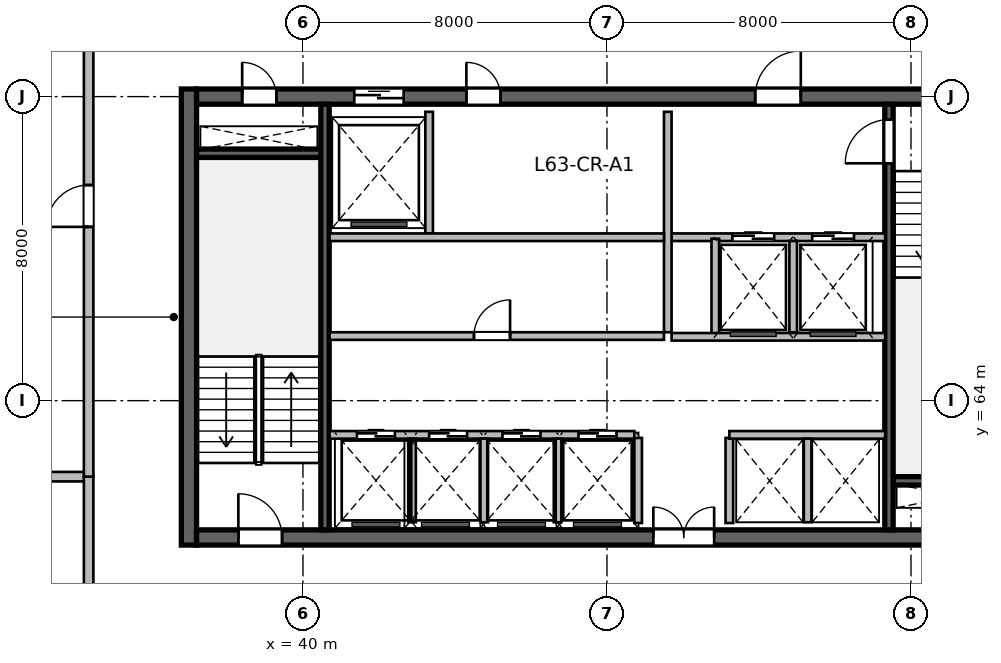
"""IFC4 building model, lengths in metres.
Left out: names, types, materials, properties, quantities, classifications, styles, units other than length and angle.
Written with IfcOpenShell. Run it as: python <this file> out.ifc"""

import sys

from ifc_helpers import new_model, si_unit, direction, frame, frame_2d, origin, place, context, subcontext, project, spatial, rectangle, extrude, source, transform, mapped, element, fill, save


model = new_model("IFC4")
c1 = context("Model", 3, precision=1e-05, world=origin(), true_north=direction((0.0, 1.0)))
c2 = subcontext(c1, "Body", "Model", "MODEL_VIEW")
j1 = project(units=[si_unit("LENGTHUNIT", "METRE"), si_unit("PLANEANGLEUNIT", "RADIAN")], contexts=[c1])
p1 = place(None, origin())
s1 = spatial("IfcSite", under=j1, at=p1, CompositionType="ELEMENT")
p2 = place(p1, origin())
s2 = spatial("IfcBuilding", under=s1, at=p2, CompositionType="ELEMENT")
p3 = place(p2, frame((0.0, 0.0, 260.1)))
s3 = spatial("IfcBuildingStorey", under=s2, at=p3, CompositionType="ELEMENT", Elevation=260.1)
m1 = source(origin(), c2, "Body", "SweptSolid", [
    extrude(rectangle(XDim=12.0, YDim=0.4, at=frame_2d((6.0, 0.0))), origin(), (0.0, 0.0, 1.0), 3.9),
])
p4 = place(p3, frame((37.0, 60.2, 0.0), z_axis=(0.0, 0.0, 1.0), x_axis=(0.0, 1.0, 0.0)))
e1 = element("IfcWall", 1, at=p4, inside=s3, PredefinedType="SHEAR", context=c2, shape_type="MappedRepresentation", body=[
    mapped(m1, transform((0.0, 0.0, 0.0), scale=1.0)),
])
m2 = source(origin(), c2, "Body", "SweptSolid", [
    extrude(rectangle(XDim=21.6, YDim=0.4, at=frame_2d((10.8, 0.0))), origin(), (0.0, 0.0, 1.0), 3.9),
])
p5 = place(p3, frame((37.2, 60.4, 0.0), z_axis=(0.0, 0.0, 1.0), x_axis=(1.0, 0.0, 0.0)))
e2 = element("IfcWall", 2, at=p5, inside=s3, PredefinedType="SHEAR", context=c2, shape_type="MappedRepresentation", body=[
    mapped(m2, transform((0.0, 0.0, 0.0), scale=1.0)),
])
p6 = place(p5, frame((1.1, 0.0, 0.0)))
e3 = element("IfcOpeningElement", 3, at=p6, cuts=e2, PredefinedType="OPENING", context=c2, shape_type="SweptSolid", body=[
    extrude(rectangle(XDim=1.15, YDim=2.15, at=frame_2d((0.575, 1.075))), frame((0.0, 0.21, 0.0), z_axis=(0.0, -1.0, 0.0), x_axis=(1.0, 0.0, 0.0)), (0.0, 0.0, 1.0), 0.42),
])
p7 = place(p5, frame((19.5, 0.0, 0.0)))
e4 = element("IfcOpeningElement", 4, at=p7, cuts=e2, PredefinedType="OPENING", context=c2, shape_type="SweptSolid", body=[
    extrude(rectangle(XDim=0.9, YDim=2.1, at=frame_2d((0.45, 1.05))), frame((0.0, 0.21, 0.0), z_axis=(0.0, -1.0, 0.0), x_axis=(1.0, 0.0, 0.0)), (0.0, 0.0, 1.0), 0.42),
])
p8 = place(p5, frame((12.02, 0.0, 0.0)))
e5 = element("IfcOpeningElement", 5, at=p8, cuts=e2, PredefinedType="OPENING", context=c2, shape_type="SweptSolid", body=[
    extrude(rectangle(XDim=1.6, YDim=2.15, at=frame_2d((0.8, 1.075))), frame((0.0, 0.21, 0.0), z_axis=(0.0, -1.0, 0.0), x_axis=(1.0, 0.0, 0.0)), (0.0, 0.0, 1.0), 0.42),
])
p9 = place(p3, frame((37.2, 72.0, 0.0), z_axis=(0.0, 0.0, 1.0), x_axis=(1.0, 0.0, 0.0)))
e6 = element("IfcWall", 6, at=p9, inside=s3, PredefinedType="SHEAR", context=c2, shape_type="MappedRepresentation", body=[
    mapped(m2, transform((0.0, 0.0, 0.0), scale=1.0)),
])
p10 = place(p9, frame((1.2, 0.0, 0.0)))
e7 = element("IfcOpeningElement", 7, at=p10, cuts=e6, PredefinedType="OPENING", context=c2, shape_type="SweptSolid", body=[
    extrude(rectangle(XDim=0.9, YDim=2.1, at=frame_2d((0.45, 1.05))), frame((0.0, 0.21, 0.0), z_axis=(0.0, -1.0, 0.0), x_axis=(1.0, 0.0, 0.0)), (0.0, 0.0, 1.0), 0.42),
])
p11 = place(p9, frame((14.7, 0.0, 0.0)))
e8 = element("IfcOpeningElement", 8, at=p11, cuts=e6, PredefinedType="OPENING", context=c2, shape_type="SweptSolid", body=[
    extrude(rectangle(XDim=1.2, YDim=2.15, at=frame_2d((0.6, 1.075))), frame((0.0, 0.21, 0.0), z_axis=(0.0, -1.0, 0.0), x_axis=(1.0, 0.0, 0.0)), (0.0, 0.0, 1.0), 0.42),
])
p12 = place(p9, frame((4.15, 0.0, 0.0)))
e9 = element("IfcOpeningElement", 9, at=p12, cuts=e6, PredefinedType="OPENING", context=c2, shape_type="SweptSolid", body=[
    extrude(rectangle(XDim=1.3, YDim=2.15, at=frame_2d((0.65, 1.075))), frame((0.0, 0.21, 0.0), z_axis=(0.0, -1.0, 0.0), x_axis=(1.0, 0.0, 0.0)), (0.0, 0.0, 1.0), 0.42),
])
p13 = place(p9, frame((7.1, 0.0, 0.0)))
e10 = element("IfcOpeningElement", 10, at=p13, cuts=e6, PredefinedType="OPENING", context=c2, shape_type="SweptSolid", body=[
    extrude(rectangle(XDim=0.9, YDim=2.1, at=frame_2d((0.45, 1.05))), frame((0.0, 0.21, 0.0), z_axis=(0.0, -1.0, 0.0), x_axis=(1.0, 0.0, 0.0)), (0.0, 0.0, 1.0), 0.42),
])
m3 = source(origin(), c2, "Body", "SweptSolid", [
    extrude(rectangle(XDim=3.27, YDim=0.22, at=frame_2d((1.635, 0.0))), origin(), (0.0, 0.0, 1.0), 3.9),
])
for number, where, z_axis, x_axis in (
    (11, (37.2, 70.51, 0.0), (0.0, 0.0, 1.0), (1.0, 0.0, 0.0)),
    (12, (55.53, 61.89, 0.0), (0.0, 0.0, 1.0), (1.0, 0.0, 0.0)),
):
    element("IfcWall", number, at=place(p3, frame(where, z_axis=z_axis, x_axis=x_axis)), inside=s3, PredefinedType="SHEAR", context=c2, shape_type="MappedRepresentation", body=[
        mapped(m3, transform((0.0, 0.0, 0.0), scale=1.0)),
    ])
m4 = source(origin(), c2, "Body", "SweptSolid", [
    extrude(rectangle(XDim=11.2, YDim=0.22, at=frame_2d((5.6, 0.0))), origin(), (0.0, 0.0, 1.0), 3.9),
])
p14 = place(p3, frame((40.58, 60.6, 0.0), z_axis=(0.0, 0.0, 1.0), x_axis=(0.0, 1.0, 0.0)))
e13 = element("IfcWall", 13, at=p14, inside=s3, PredefinedType="SHEAR", context=c2, shape_type="MappedRepresentation", body=[
    mapped(m4, transform((0.0, 0.0, 0.0), scale=1.0)),
])
p15 = place(p3, frame((55.42, 60.6, 0.0), z_axis=(0.0, 0.0, 1.0), x_axis=(0.0, 1.0, 0.0)))
e14 = element("IfcWall", 14, at=p15, inside=s3, PredefinedType="SHEAR", context=c2, shape_type="MappedRepresentation", body=[
    mapped(m4, transform((0.0, 0.0, 0.0), scale=1.0)),
])
p16 = place(p15, frame((9.645, 0.0, 0.0)))
e15 = element("IfcOpeningElement", 15, at=p16, cuts=e14, PredefinedType="OPENING", context=c2, shape_type="SweptSolid", body=[
    extrude(rectangle(XDim=1.15, YDim=2.15, at=frame_2d((0.575, 1.075))), frame((0.0, 0.12, 0.0), z_axis=(0.0, -1.0, 0.0), x_axis=(1.0, 0.0, 0.0)), (0.0, 0.0, 1.0), 0.24),
])
m5 = source(origin(), c2, "Body", "SweptSolid", [
    extrude(rectangle(XDim=2.24, YDim=0.2, at=frame_2d((1.12, 0.0))), origin(), (0.0, 0.0, 1.0), 3.65),
])
for number, where, z_axis, x_axis in (
    (16, (48.82, 60.78, 0.0), (0.0, 0.0, 1.0), (0.0, 1.0, 0.0)),
    (17, (51.22, 60.78, 0.0), (0.0, 0.0, 1.0), (0.0, 1.0, 0.0)),
):
    element("IfcWall", number, at=place(p3, frame(where, z_axis=z_axis, x_axis=x_axis)), inside=s3, PredefinedType="SOLIDWALL", context=c2, shape_type="MappedRepresentation", body=[
        mapped(m5, transform((0.0, 0.0, 0.0), scale=1.0)),
    ])
m6 = source(origin(), c2, "Body", "SweptSolid", [
    extrude(rectangle(XDim=5.62, YDim=0.2, at=frame_2d((2.81, 0.0))), origin(), (0.0, 0.0, 1.0), 3.65),
])
p17 = place(p3, frame((49.7, 68.3, 0.0), z_axis=(0.0, 0.0, 1.0), x_axis=(1.0, 0.0, 0.0)))
e18 = element("IfcWall", 18, at=p17, inside=s3, PredefinedType="SOLIDWALL", context=c2, shape_type="MappedRepresentation", body=[
    mapped(m6, transform((0.0, 0.0, 0.0), scale=1.0)),
])
p18 = place(p17, frame((1.6, 0.0, 0.0)))
e19 = element("IfcOpeningElement", 19, at=p18, cuts=e18, PredefinedType="OPENING", context=c2, shape_type="SweptSolid", body=[
    extrude(rectangle(XDim=1.1, YDim=2.15, at=frame_2d((0.55, 1.075))), frame((0.0, 0.11, 0.0), z_axis=(0.0, -1.0, 0.0), x_axis=(1.0, 0.0, 0.0)), (0.0, 0.0, 1.0), 0.22),
])
p19 = place(p17, frame((3.7, 0.0, 0.0)))
e20 = element("IfcOpeningElement", 20, at=p19, cuts=e18, PredefinedType="OPENING", context=c2, shape_type="SweptSolid", body=[
    extrude(rectangle(XDim=1.1, YDim=2.15, at=frame_2d((0.55, 1.075))), frame((0.0, 0.11, 0.0), z_axis=(0.0, -1.0, 0.0), x_axis=(1.0, 0.0, 0.0)), (0.0, 0.0, 1.0), 0.22),
])
m7 = source(origin(), c2, "Body", "SweptSolid", [
    extrude(rectangle(XDim=5.8, YDim=0.2, at=frame_2d((2.9, 0.0))), origin(), (0.0, 0.0, 1.0), 3.65),
])
p20 = place(p3, frame((49.6, 65.8, 0.0), z_axis=(0.0, 0.0, 1.0), x_axis=(0.0, 1.0, 0.0)))
e21 = element("IfcWall", 21, at=p20, inside=s3, PredefinedType="SOLIDWALL", context=c2, shape_type="MappedRepresentation", body=[
    mapped(m7, transform((0.0, 0.0, 0.0), scale=1.0)),
])
m8 = source(origin(), c2, "Body", "SweptSolid", [
    extrude(rectangle(XDim=2.58, YDim=0.2, at=frame_2d((1.29, 0.0))), origin(), (0.0, 0.0, 1.0), 3.65),
])
p21 = place(p3, frame((50.85, 65.68, 0.0), z_axis=(0.0, 0.0, 1.0), x_axis=(0.0, 1.0, 0.0)))
e22 = element("IfcWall", 22, at=p21, inside=s3, PredefinedType="SOLIDWALL", context=c2, shape_type="MappedRepresentation", body=[
    mapped(m8, transform((0.0, 0.0, 0.0), scale=1.0)),
])
m9 = source(origin(), c2, "Body", "SweptSolid", [
    extrude(rectangle(XDim=2.4, YDim=0.2, at=frame_2d((1.2, 0.0))), origin(), (0.0, 0.0, 1.0), 3.65),
])
p22 = place(p3, frame((52.9, 65.8, 0.0), z_axis=(0.0, 0.0, 1.0), x_axis=(0.0, 1.0, 0.0)))
e23 = element("IfcWall", 23, at=p22, inside=s3, PredefinedType="SOLIDWALL", context=c2, shape_type="MappedRepresentation", body=[
    mapped(m9, transform((0.0, 0.0, 0.0), scale=1.0)),
])
p23 = place(p3, frame((49.7, 65.68, 0.0), z_axis=(0.0, 0.0, 1.0), x_axis=(1.0, 0.0, 0.0)))
e24 = element("IfcWall", 24, at=p23, inside=s3, PredefinedType="SOLIDWALL", context=c2, shape_type="MappedRepresentation", body=[
    mapped(m6, transform((0.0, 0.0, 0.0), scale=1.0)),
])
m10 = source(origin(), c2, "Body", "SweptSolid", [
    extrude(rectangle(XDim=3.2, YDim=0.2, at=frame_2d((1.6, 0.0))), origin(), (0.0, 0.0, 1.0), 3.65),
])
p24 = place(p3, frame((43.32, 68.4, 0.0), z_axis=(0.0, 0.0, 1.0), x_axis=(0.0, 1.0, 0.0)))
e25 = element("IfcWall", 25, at=p24, inside=s3, PredefinedType="SOLIDWALL", context=c2, shape_type="MappedRepresentation", body=[
    mapped(m10, transform((0.0, 0.0, 0.0), scale=1.0)),
])
m11 = source(origin(), c2, "Body", "SweptSolid", [
    extrude(rectangle(XDim=8.8, YDim=0.2, at=frame_2d((4.4, 0.0))), origin(), (0.0, 0.0, 1.0), 3.65),
])
p25 = place(p3, frame((40.7, 68.3, 0.0), z_axis=(0.0, 0.0, 1.0), x_axis=(1.0, 0.0, 0.0)))
e26 = element("IfcWall", 26, at=p25, inside=s3, PredefinedType="SOLIDWALL", context=c2, shape_type="MappedRepresentation", body=[
    mapped(m11, transform((0.0, 0.0, 0.0), scale=1.0)),
])
m12 = source(origin(), c2, "Body", "SweptSolid", [
    extrude(rectangle(XDim=8.02, YDim=0.2, at=frame_2d((4.01, 0.0))), origin(), (0.0, 0.0, 1.0), 3.65),
])
p26 = place(p3, frame((40.7, 63.1, 0.0), z_axis=(0.0, 0.0, 1.0), x_axis=(1.0, 0.0, 0.0)))
e27 = element("IfcWall", 27, at=p26, inside=s3, PredefinedType="SOLIDWALL", context=c2, shape_type="MappedRepresentation", body=[
    mapped(m12, transform((0.0, 0.0, 0.0), scale=1.0)),
])
p27 = place(p26, frame((0.72, 0.0, 0.0)))
e28 = element("IfcOpeningElement", 28, at=p27, cuts=e27, PredefinedType="OPENING", context=c2, shape_type="SweptSolid", body=[
    extrude(rectangle(XDim=1.0, YDim=2.15, at=frame_2d((0.5, 1.075))), frame((0.0, 0.11, 0.0), z_axis=(0.0, -1.0, 0.0), x_axis=(1.0, 0.0, 0.0)), (0.0, 0.0, 1.0), 0.22),
])
p28 = place(p26, frame((2.62, 0.0, 0.0)))
e29 = element("IfcOpeningElement", 29, at=p28, cuts=e27, PredefinedType="OPENING", context=c2, shape_type="SweptSolid", body=[
    extrude(rectangle(XDim=1.0, YDim=2.15, at=frame_2d((0.5, 1.075))), frame((0.0, 0.11, 0.0), z_axis=(0.0, -1.0, 0.0), x_axis=(1.0, 0.0, 0.0)), (0.0, 0.0, 1.0), 0.22),
])
p29 = place(p26, frame((4.55, 0.0, 0.0)))
e30 = element("IfcOpeningElement", 30, at=p29, cuts=e27, PredefinedType="OPENING", context=c2, shape_type="SweptSolid", body=[
    extrude(rectangle(XDim=1.0, YDim=2.15, at=frame_2d((0.5, 1.075))), frame((0.0, 0.11, 0.0), z_axis=(0.0, -1.0, 0.0), x_axis=(1.0, 0.0, 0.0)), (0.0, 0.0, 1.0), 0.22),
])
p30 = place(p26, frame((6.55, 0.0, 0.0)))
e31 = element("IfcOpeningElement", 31, at=p30, cuts=e27, PredefinedType="OPENING", context=c2, shape_type="SweptSolid", body=[
    extrude(rectangle(XDim=1.0, YDim=2.15, at=frame_2d((0.5, 1.075))), frame((0.0, 0.11, 0.0), z_axis=(0.0, -1.0, 0.0), x_axis=(1.0, 0.0, 0.0)), (0.0, 0.0, 1.0), 0.22),
])
m13 = source(origin(), c2, "Body", "SweptSolid", [
    extrude(rectangle(XDim=4.1, YDim=0.2, at=frame_2d((2.05, 0.0))), origin(), (0.0, 0.0, 1.0), 3.65),
])
p31 = place(p3, frame((51.22, 63.1, 0.0), z_axis=(0.0, 0.0, 1.0), x_axis=(1.0, 0.0, 0.0)))
e32 = element("IfcWall", 32, at=p31, inside=s3, PredefinedType="SOLIDWALL", context=c2, shape_type="MappedRepresentation", body=[
    mapped(m13, transform((0.0, 0.0, 0.0), scale=1.0)),
])
m14 = source(origin(), c2, "Body", "SweptSolid", [
    extrude(rectangle(XDim=2.2, YDim=0.2, at=frame_2d((1.1, 0.0))), origin(), (0.0, 0.0, 1.0), 3.65),
])
for number, where, z_axis, x_axis in (
    (33, (42.87, 60.8, 0.0), (0.0, 0.0, 1.0), (0.0, 1.0, 0.0)),
    (34, (44.77, 60.8, 0.0), (0.0, 0.0, 1.0), (0.0, 1.0, 0.0)),
    (35, (46.7, 60.8, 0.0), (0.0, 0.0, 1.0), (0.0, 1.0, 0.0)),
    (36, (53.28, 60.8, 0.0), (0.0, 0.0, 1.0), (0.0, 1.0, 0.0)),
):
    element("IfcWall", number, at=place(p3, frame(where, z_axis=z_axis, x_axis=x_axis)), inside=s3, PredefinedType="SOLIDWALL", context=c2, shape_type="MappedRepresentation", body=[
        mapped(m14, transform((0.0, 0.0, 0.0), scale=1.0)),
    ])
p32 = place(p3, frame((40.7, 65.7, 0.0), z_axis=(0.0, 0.0, 1.0), x_axis=(1.0, 0.0, 0.0)))
e37 = element("IfcWall", 37, at=p32, inside=s3, PredefinedType="SOLIDWALL", context=c2, shape_type="MappedRepresentation", body=[
    mapped(m11, transform((0.0, 0.0, 0.0), scale=1.0)),
])
p33 = place(p32, frame((3.8, 0.0, 0.0)))
e38 = element("IfcOpeningElement", 38, at=p33, cuts=e37, PredefinedType="OPENING", context=c2, shape_type="SweptSolid", body=[
    extrude(rectangle(XDim=0.95, YDim=2.15, at=frame_2d((0.475, 1.075))), frame((0.0, 0.11, 0.0), z_axis=(0.0, -1.0, 0.0), x_axis=(1.0, 0.0, 0.0)), (0.0, 0.0, 1.0), 0.22),
])
m15 = source(origin(), c2, "Body", "SweptSolid", [
    extrude(rectangle(XDim=16.892, YDim=0.25, at=frame_2d((8.446, 0.0))), origin(), (0.0, 0.0, 1.0), 3.65),
])
p34 = place(p3, frame((17.469, 62.0, 0.0), z_axis=(0.0, 0.0, 1.0), x_axis=(1.0, 0.0, 0.0)))
e39 = element("IfcWall", 39, at=p34, inside=s3, PredefinedType="PARTITIONING", context=c2, shape_type="MappedRepresentation", body=[
    mapped(m15, transform((0.0, 0.0, 0.0), scale=1.0)),
])
m16 = source(origin(), c2, "Body", "SweptSolid", [
    extrude(rectangle(XDim=4.04, YDim=0.25, at=frame_2d((2.02, 0.0))), origin(), (0.0, 0.0, 1.0), 3.65),
])
p35 = place(p3, frame((34.36, 57.96, 0.0), z_axis=(0.0, 0.0, 1.0), x_axis=(0.0, 1.0, 0.0)))
e40 = element("IfcWall", 40, at=p35, inside=s3, PredefinedType="PARTITIONING", context=c2, shape_type="MappedRepresentation", body=[
    mapped(m16, transform((0.0, 0.0, 0.0), scale=1.0)),
])
m17 = source(origin(), c2, "Body", "SweptSolid", [
    extrude(rectangle(XDim=14.245, YDim=0.25, at=frame_2d((7.123, 0.0))), origin(), (0.0, 0.0, 1.0), 3.65),
])
p36 = place(p3, frame((34.36, 62.0, 0.0), z_axis=(0.0, 0.0, 1.0), x_axis=(0.0, 1.0, 0.0)))
e41 = element("IfcWall", 41, at=p36, inside=s3, PredefinedType="PARTITIONING", context=c2, shape_type="MappedRepresentation", body=[
    mapped(m17, transform((0.0, 0.0, 0.0), scale=1.0)),
])
p37 = place(p36, frame((6.573, 0.0, 0.0)))
e42 = element("IfcOpeningElement", 42, at=p37, cuts=e41, PredefinedType="OPENING", context=c2, shape_type="SweptSolid", body=[
    extrude(rectangle(XDim=1.1, YDim=2.15, at=frame_2d((0.55, 1.075))), frame((0.0, 0.135, 0.0), z_axis=(0.0, -1.0, 0.0), x_axis=(1.0, 0.0, 0.0)), (0.0, 0.0, 1.0), 0.27),
])
m18 = source(origin(), c2, "Body", "SweptSolid", [
    extrude(rectangle(XDim=1.15, YDim=2.15, at=frame_2d((0.575, 1.075))), frame((0.0, 0.025, 0.0), z_axis=(0.0, -1.0, 0.0), x_axis=(1.0, 0.0, 0.0)), (0.0, 0.0, 1.0), 0.05),
])
p38 = place(p6, origin())
e43 = element("IfcDoor", 43, at=p38, inside=s3, OperationType="SINGLE_SWING_LEFT", PredefinedType="DOOR", context=c2, shape_type="MappedRepresentation", body=[
    mapped(m18, transform((0.0, 0.0, 0.0), scale=1.0)),
])
fill(e3, e43)
m19 = source(origin(), c2, "Body", "SweptSolid", [
    extrude(rectangle(XDim=0.9, YDim=2.1, at=frame_2d((0.45, 1.05))), frame((0.0, 0.025, 0.0), z_axis=(0.0, -1.0, 0.0), x_axis=(1.0, 0.0, 0.0)), (0.0, 0.0, 1.0), 0.05),
])
p39 = place(p10, origin())
e44 = element("IfcDoor", 44, at=p39, inside=s3, OperationType="SINGLE_SWING_LEFT", PredefinedType="DOOR", context=c2, shape_type="MappedRepresentation", body=[
    mapped(m19, transform((0.0, 0.0, 0.0), scale=1.0)),
])
fill(e7, e44)
p40 = place(p16, origin())
e45 = element("IfcDoor", 45, at=p40, inside=s3, OperationType="SINGLE_SWING_LEFT", PredefinedType="DOOR", context=c2, shape_type="MappedRepresentation", body=[
    mapped(m18, transform((0.0, 0.0, 0.0), scale=1.0)),
])
fill(e15, e45)
m20 = source(origin(), c2, "Body", "SweptSolid", [
    extrude(rectangle(XDim=1.6, YDim=2.15, at=frame_2d((0.8, 1.075))), frame((0.0, 0.025, 0.0), z_axis=(0.0, -1.0, 0.0), x_axis=(1.0, 0.0, 0.0)), (0.0, 0.0, 1.0), 0.05),
])
p41 = place(p8, origin())
e46 = element("IfcDoor", 46, at=p41, inside=s3, OperationType="DOUBLE_DOOR_SINGLE_SWING", PredefinedType="DOOR", context=c2, shape_type="MappedRepresentation", body=[
    mapped(m20, transform((0.0, 0.0, 0.0), scale=1.0)),
])
fill(e5, e46)
m21 = source(origin(), c2, "Body", "SweptSolid", [
    extrude(rectangle(XDim=1.2, YDim=2.15, at=frame_2d((0.6, 1.075))), frame((0.0, 0.025, 0.0), z_axis=(0.0, -1.0, 0.0), x_axis=(1.0, 0.0, 0.0)), (0.0, 0.0, 1.0), 0.05),
])
p42 = place(p11, origin())
e47 = element("IfcDoor", 47, at=p42, inside=s3, OperationType="SINGLE_SWING_RIGHT", PredefinedType="DOOR", context=c2, shape_type="MappedRepresentation", body=[
    mapped(m21, transform((0.0, 0.0, 0.0), scale=1.0)),
])
fill(e8, e47)
m22 = source(origin(), c2, "Body", "SweptSolid", [
    extrude(rectangle(XDim=1.1, YDim=2.15, at=frame_2d((0.55, 1.075))), frame((0.0, 0.025, 0.0), z_axis=(0.0, -1.0, 0.0), x_axis=(1.0, 0.0, 0.0)), (0.0, 0.0, 1.0), 0.05),
])
p43 = place(p18, origin())
e48 = element("IfcDoor", 48, at=p43, inside=s3, OperationType="DOUBLE_DOOR_SLIDING", PredefinedType="DOOR", context=c2, shape_type="MappedRepresentation", body=[
    mapped(m22, transform((0.0, 0.0, 0.0), scale=1.0)),
])
fill(e19, e48)
p44 = place(p19, origin())
e49 = element("IfcDoor", 49, at=p44, inside=s3, OperationType="DOUBLE_DOOR_SLIDING", PredefinedType="DOOR", context=c2, shape_type="MappedRepresentation", body=[
    mapped(m22, transform((0.0, 0.0, 0.0), scale=1.0)),
])
fill(e20, e49)
m23 = source(origin(), c2, "Body", "SweptSolid", [
    extrude(rectangle(XDim=1.3, YDim=2.15, at=frame_2d((0.65, 1.075))), frame((0.0, 0.025, 0.0), z_axis=(0.0, -1.0, 0.0), x_axis=(1.0, 0.0, 0.0)), (0.0, 0.0, 1.0), 0.05),
])
p45 = place(p12, origin())
e50 = element("IfcDoor", 50, at=p45, inside=s3, OperationType="DOUBLE_DOOR_SLIDING", PredefinedType="DOOR", context=c2, shape_type="MappedRepresentation", body=[
    mapped(m23, transform((0.0, 0.0, 0.0), scale=1.0)),
])
fill(e9, e50)
p46 = place(p13, origin())
e51 = element("IfcDoor", 51, at=p46, inside=s3, OperationType="SINGLE_SWING_LEFT", PredefinedType="DOOR", context=c2, shape_type="MappedRepresentation", body=[
    mapped(m19, transform((0.0, 0.0, 0.0), scale=1.0)),
])
fill(e10, e51)
m24 = source(origin(), c2, "Body", "SweptSolid", [
    extrude(rectangle(XDim=1.0, YDim=2.15, at=frame_2d((0.5, 1.075))), frame((0.0, 0.025, 0.0), z_axis=(0.0, -1.0, 0.0), x_axis=(1.0, 0.0, 0.0)), (0.0, 0.0, 1.0), 0.05),
])
p47 = place(p27, origin())
e52 = element("IfcDoor", 52, at=p47, inside=s3, OperationType="DOUBLE_DOOR_SLIDING", PredefinedType="DOOR", context=c2, shape_type="MappedRepresentation", body=[
    mapped(m24, transform((0.0, 0.0, 0.0), scale=1.0)),
])
fill(e28, e52)
p48 = place(p28, origin())
e53 = element("IfcDoor", 53, at=p48, inside=s3, OperationType="DOUBLE_DOOR_SLIDING", PredefinedType="DOOR", context=c2, shape_type="MappedRepresentation", body=[
    mapped(m24, transform((0.0, 0.0, 0.0), scale=1.0)),
])
fill(e29, e53)
p49 = place(p29, origin())
e54 = element("IfcDoor", 54, at=p49, inside=s3, OperationType="DOUBLE_DOOR_SLIDING", PredefinedType="DOOR", context=c2, shape_type="MappedRepresentation", body=[
    mapped(m24, transform((0.0, 0.0, 0.0), scale=1.0)),
])
fill(e30, e54)
p50 = place(p30, origin())
e55 = element("IfcDoor", 55, at=p50, inside=s3, OperationType="DOUBLE_DOOR_SLIDING", PredefinedType="DOOR", context=c2, shape_type="MappedRepresentation", body=[
    mapped(m24, transform((0.0, 0.0, 0.0), scale=1.0)),
])
fill(e31, e55)
m25 = source(origin(), c2, "Body", "SweptSolid", [
    extrude(rectangle(XDim=0.95, YDim=2.15, at=frame_2d((0.475, 1.075))), frame((0.0, 0.025, 0.0), z_axis=(0.0, -1.0, 0.0), x_axis=(1.0, 0.0, 0.0)), (0.0, 0.0, 1.0), 0.05),
])
p51 = place(p33, origin())
e56 = element("IfcDoor", 56, at=p51, inside=s3, OperationType="SINGLE_SWING_RIGHT", PredefinedType="DOOR", context=c2, shape_type="MappedRepresentation", body=[
    mapped(m25, transform((0.0, 0.0, 0.0), scale=1.0)),
])
fill(e38, e56)
m26 = source(origin(), c2, "Body", "SweptSolid", [
    extrude(rectangle(XDim=1.1, YDim=2.15, at=frame_2d((0.55, 1.075))), frame((0.0, 0.025, 0.0), z_axis=(0.0, -1.0, 0.0), x_axis=(1.0, 0.0, 0.0)), (0.0, 0.0, 1.0), 0.05),
])
p52 = place(p37, origin())
e57 = element("IfcDoor", 57, at=p52, inside=s3, OperationType="SINGLE_SWING_LEFT", PredefinedType="DOOR", context=c2, shape_type="MappedRepresentation", body=[
    mapped(m26, transform((0.0, 0.0, 0.0), scale=1.0)),
])
fill(e42, e57)
save(model, sys.argv[1])
